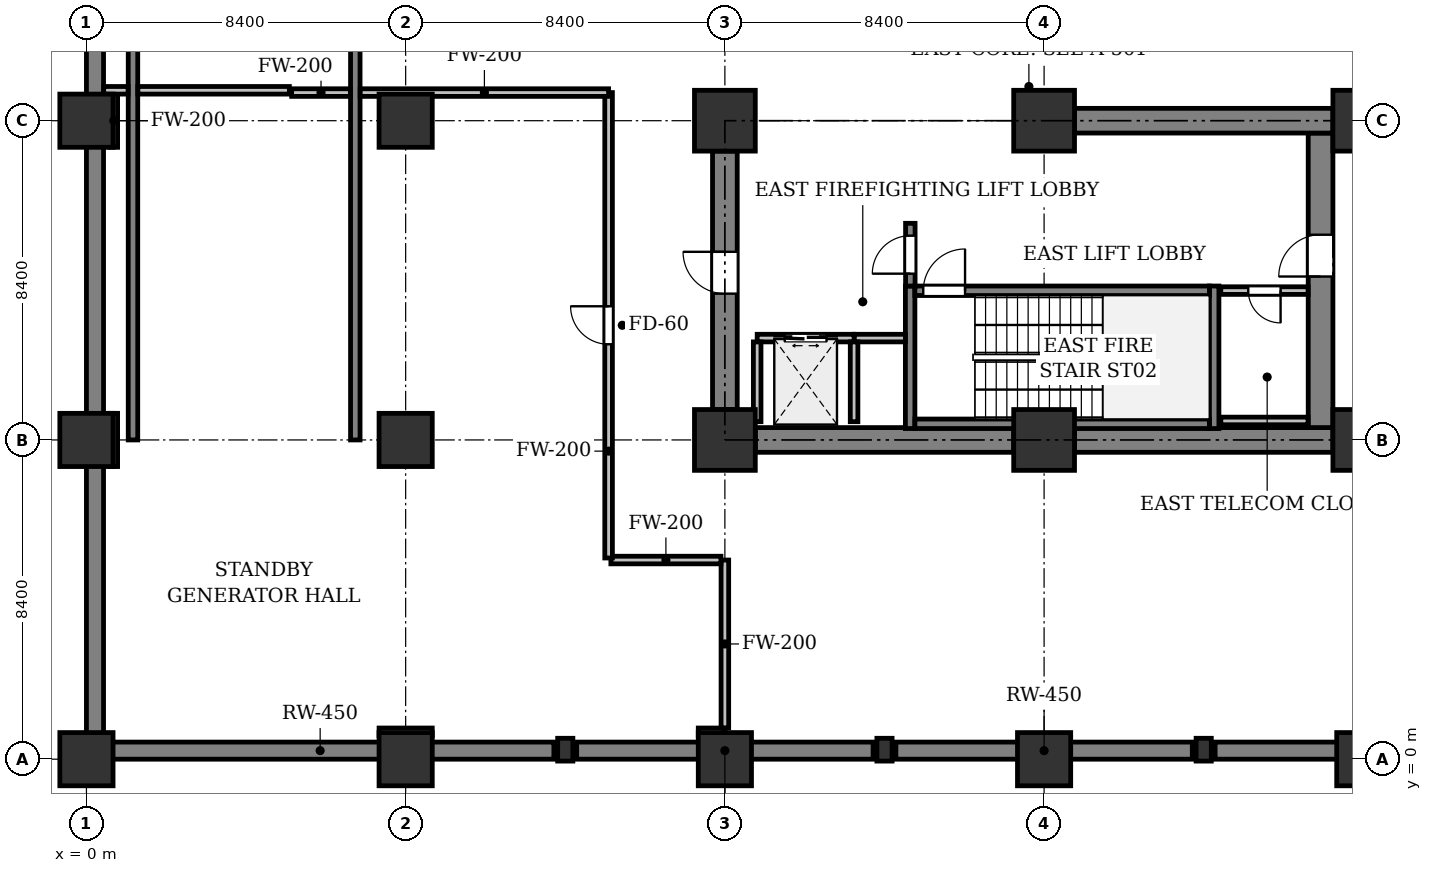
"""IFC4 building model, lengths in metres.
Left out: names, types, materials, properties, quantities, classifications, styles, units other than length and angle.
Written with IfcOpenShell. Run it as: python <this file> out.ifc"""

import sys

from ifc_helpers import new_model, si_unit, direction, frame, frame_2d, origin, origin_2d, place, context, subcontext, project, spatial, rectangle, extrude, element, fill, save


model = new_model("IFC4")
c1 = context("Model", 3, precision=1e-05, world=origin(), true_north=direction((0.0, 1.0)))
c2 = subcontext(c1, "Body", "Model", "MODEL_VIEW")
j1 = project(units=[si_unit("LENGTHUNIT", "METRE"), si_unit("PLANEANGLEUNIT", "RADIAN")], contexts=[c1])
p1 = place(None, origin())
s1 = spatial("IfcSite", under=j1, at=p1, CompositionType="ELEMENT")
p2 = place(p1, origin())
s2 = spatial("IfcBuilding", under=s1, at=p2, CompositionType="ELEMENT")
p3 = place(p2, frame((0.0, 0.0, -9.6)))
s3 = spatial("IfcBuildingStorey", under=s2, at=p3, CompositionType="ELEMENT", Elevation=-9.6)
p4 = place(p3, frame((0.0, 0.225, 0.0), z_axis=(0.0, 0.0, 1.0), x_axis=(1.0, 0.0, 0.0)))
e1 = element("IfcWall", 1, at=p4, inside=s3, PredefinedType="SOLIDWALL", context=c2, shape_type="SweptSolid", body=[
    extrude(rectangle(XDim=12.3, YDim=0.45, at=frame_2d((6.15, 0.0))), origin(), (0.0, 0.0, 1.0), 4.48),
])
for number, where, z_axis, x_axis in (
    (2, (12.9, 0.225, 0.0), (0.0, 0.0, 1.0), (1.0, 0.0, 0.0)),
    (3, (21.3, 0.225, 0.0), (0.0, 0.0, 1.0), (1.0, 0.0, 0.0)),
):
    element("IfcWall", number, at=place(p3, frame(where, z_axis=z_axis, x_axis=x_axis)), inside=s3, PredefinedType="SOLIDWALL", context=c2, shape_type="SweptSolid", body=[
        extrude(rectangle(XDim=7.8, YDim=0.45, at=frame_2d((3.9, 0.0))), origin(), (0.0, 0.0, 1.0), 4.48),
    ])
p5 = place(p3, frame((29.7, 0.225, 0.0), z_axis=(0.0, 0.0, 1.0), x_axis=(1.0, 0.0, 0.0)))
e4 = element("IfcWall", 4, at=p5, inside=s3, PredefinedType="SOLIDWALL", context=c2, shape_type="SweptSolid", body=[
    extrude(rectangle(XDim=29.1, YDim=0.45, at=frame_2d((14.55, 0.0))), origin(), (0.0, 0.0, 1.0), 4.48),
])
p6 = place(p3, frame((0.225, 0.45, 0.0), z_axis=(0.0, 0.0, 1.0), x_axis=(0.0, 1.0, 0.0)))
e5 = element("IfcWall", 5, at=p6, inside=s3, PredefinedType="SOLIDWALL", context=c2, shape_type="SweptSolid", body=[
    extrude(rectangle(XDim=49.5, YDim=0.45, at=frame_2d((24.75, 0.0))), origin(), (0.0, 0.0, 1.0), 4.48),
])
for number, where, z_axis, x_axis in (
    (6, (1.225, 8.4, 0.0), (0.0, 0.0, 1.0), (0.0, 1.0, 0.0)),
    (7, (7.075, 8.4, 0.0), (0.0, 0.0, 1.0), (0.0, 1.0, 0.0)),
):
    element("IfcWall", number, at=place(p3, frame(where, z_axis=z_axis, x_axis=x_axis)), inside=s3, PredefinedType="SHEAR", context=c2, shape_type="SweptSolid", body=[
        extrude(rectangle(XDim=38.4, YDim=0.25, at=frame_2d((19.2, 0.0))), origin(), (0.0, 0.0, 1.0), 4.48),
    ])
for number, where, z_axis, x_axis in (
    (8, (0.0, 0.0, 0.0), (0.0, 0.0, 1.0), (1.0, 0.0, 0.0)),
    (9, (0.0, 8.4, 0.0), (0.0, 0.0, 1.0), (1.0, 0.0, 0.0)),
    (10, (0.0, 16.8, 0.0), (0.0, 0.0, 1.0), (1.0, 0.0, 0.0)),
    (11, (8.4, 0.0, 0.0), (0.0, 0.0, 1.0), (1.0, 0.0, 0.0)),
    (12, (8.4, 8.4, 0.0), (0.0, 0.0, 1.0), (1.0, 0.0, 0.0)),
    (13, (8.4, 16.8, 0.0), (0.0, 0.0, 1.0), (1.0, 0.0, 0.0)),
    (14, (16.8, 0.0, 0.0), (0.0, 0.0, 1.0), (1.0, 0.0, 0.0)),
):
    element("IfcColumn", number, at=place(p3, frame(where, z_axis=z_axis, x_axis=x_axis)), inside=s3, PredefinedType="COLUMN", context=c2, shape_type="SweptSolid", body=[
        extrude(rectangle(XDim=1.4, YDim=1.4, at=origin_2d()), origin(), (0.0, 0.0, 1.0), 4.8),
    ])
for number, where, z_axis, x_axis in (
    (15, (16.8, 8.4, 0.0), (0.0, 0.0, 1.0), (1.0, 0.0, 0.0)),
    (16, (16.8, 16.8, 0.0), (0.0, 0.0, 1.0), (1.0, 0.0, 0.0)),
):
    element("IfcColumn", number, at=place(p3, frame(where, z_axis=z_axis, x_axis=x_axis)), inside=s3, PredefinedType="COLUMN", context=c2, shape_type="SweptSolid", body=[
        extrude(rectangle(XDim=1.6, YDim=1.6, at=origin_2d()), origin(), (0.0, 0.0, 1.0), 4.8),
    ])
p7 = place(p3, frame((25.2, 0.0, 0.0), z_axis=(0.0, 0.0, 1.0), x_axis=(1.0, 0.0, 0.0)))
e17 = element("IfcColumn", 17, at=p7, inside=s3, PredefinedType="COLUMN", context=c2, shape_type="SweptSolid", body=[
    extrude(rectangle(XDim=1.4, YDim=1.4, at=origin_2d()), origin(), (0.0, 0.0, 1.0), 4.8),
])
for number, where, z_axis, x_axis in (
    (18, (25.2, 8.4, 0.0), (0.0, 0.0, 1.0), (1.0, 0.0, 0.0)),
    (19, (25.2, 16.8, 0.0), (0.0, 0.0, 1.0), (1.0, 0.0, 0.0)),
):
    element("IfcColumn", number, at=place(p3, frame(where, z_axis=z_axis, x_axis=x_axis)), inside=s3, PredefinedType="COLUMN", context=c2, shape_type="SweptSolid", body=[
        extrude(rectangle(XDim=1.6, YDim=1.6, at=origin_2d()), origin(), (0.0, 0.0, 1.0), 4.8),
    ])
p8 = place(p3, frame((33.6, 0.0, 0.0), z_axis=(0.0, 0.0, 1.0), x_axis=(1.0, 0.0, 0.0)))
e20 = element("IfcColumn", 20, at=p8, inside=s3, PredefinedType="COLUMN", context=c2, shape_type="SweptSolid", body=[
    extrude(rectangle(XDim=1.4, YDim=1.4, at=origin_2d()), origin(), (0.0, 0.0, 1.0), 4.8),
])
for number, where, z_axis, x_axis in (
    (21, (33.6, 8.4, 0.0), (0.0, 0.0, 1.0), (1.0, 0.0, 0.0)),
    (22, (33.6, 16.8, 0.0), (0.0, 0.0, 1.0), (1.0, 0.0, 0.0)),
):
    element("IfcColumn", number, at=place(p3, frame(where, z_axis=z_axis, x_axis=x_axis)), inside=s3, PredefinedType="COLUMN", context=c2, shape_type="SweptSolid", body=[
        extrude(rectangle(XDim=1.6, YDim=1.6, at=origin_2d()), origin(), (0.0, 0.0, 1.0), 4.8),
    ])
for number, where, z_axis, x_axis in (
    (23, (12.6, 0.25, 0.0), (0.0, 0.0, 1.0), (1.0, 0.0, 0.0)),
    (24, (21.0, 0.25, 0.0), (0.0, 0.0, 1.0), (1.0, 0.0, 0.0)),
    (25, (29.4, 0.25, 0.0), (0.0, 0.0, 1.0), (1.0, 0.0, 0.0)),
):
    element("IfcColumn", number, at=place(p3, frame(where, z_axis=z_axis, x_axis=x_axis)), inside=s3, PredefinedType="PILASTER", context=c2, shape_type="SweptSolid", body=[
        extrude(rectangle(XDim=0.4, YDim=0.6, at=origin_2d()), origin(), (0.0, 0.0, 1.0), 4.8),
    ])
p9 = place(p3, frame((17.6, 8.4, 0.0), z_axis=(0.0, 0.0, 1.0), x_axis=(1.0, 0.0, 0.0)))
e26 = element("IfcWall", 26, at=p9, inside=s3, PredefinedType="SHEAR", context=c2, shape_type="SweptSolid", body=[
    extrude(rectangle(XDim=6.8, YDim=0.65, at=frame_2d((3.4, 0.0))), origin(), (0.0, 0.0, 1.0), 4.48),
])
p10 = place(p3, frame((26.0, 8.4, 0.0), z_axis=(0.0, 0.0, 1.0), x_axis=(1.0, 0.0, 0.0)))
e27 = element("IfcWall", 27, at=p10, inside=s3, PredefinedType="SHEAR", context=c2, shape_type="SweptSolid", body=[
    extrude(rectangle(XDim=6.8, YDim=0.65, at=frame_2d((3.4, 0.0))), origin(), (0.0, 0.0, 1.0), 4.48),
])
p11 = place(p3, frame((32.475, 8.725, 0.0), z_axis=(0.0, 0.0, 1.0), x_axis=(0.0, 1.0, 0.0)))
e28 = element("IfcWall", 28, at=p11, inside=s3, PredefinedType="SHEAR", context=c2, shape_type="SweptSolid", body=[
    extrude(rectangle(XDim=7.75, YDim=0.65, at=frame_2d((3.875, 0.0))), origin(), (0.0, 0.0, 1.0), 4.48),
])
p12 = place(p11, frame((3.975, 0.0, 0.0)))
e29 = element("IfcOpeningElement", 29, at=p12, cuts=e28, PredefinedType="OPENING", context=c2, shape_type="SweptSolid", body=[
    extrude(rectangle(XDim=1.1, YDim=2.15, at=frame_2d((0.55, 1.075))), frame((0.0, 0.335, 0.0), z_axis=(0.0, -1.0, 0.0), x_axis=(1.0, 0.0, 0.0)), (0.0, 0.0, 1.0), 0.67),
])
p13 = place(p3, frame((16.8, 9.2, 0.0), z_axis=(0.0, 0.0, 1.0), x_axis=(0.0, 1.0, 0.0)))
e30 = element("IfcWall", 30, at=p13, inside=s3, PredefinedType="SHEAR", context=c2, shape_type="SweptSolid", body=[
    extrude(rectangle(XDim=6.8, YDim=0.65, at=frame_2d((3.4, 0.0))), origin(), (0.0, 0.0, 1.0), 4.48),
])
p14 = place(p13, frame((3.05, 0.0, 0.0)))
e31 = element("IfcOpeningElement", 31, at=p14, cuts=e30, PredefinedType="OPENING", context=c2, shape_type="SweptSolid", body=[
    extrude(rectangle(XDim=1.1, YDim=2.15, at=frame_2d((0.55, 1.075))), frame((0.0, 0.335, 0.0), z_axis=(0.0, -1.0, 0.0), x_axis=(1.0, 0.0, 0.0)), (0.0, 0.0, 1.0), 0.67),
])
p15 = place(p3, frame((26.0, 16.8, 0.0), z_axis=(0.0, 0.0, 1.0), x_axis=(1.0, 0.0, 0.0)))
e32 = element("IfcWall", 32, at=p15, inside=s3, PredefinedType="SHEAR", context=c2, shape_type="SweptSolid", body=[
    extrude(rectangle(XDim=6.8, YDim=0.65, at=frame_2d((3.4, 0.0))), origin(), (0.0, 0.0, 1.0), 4.48),
])
for number, where, z_axis, x_axis in (
    (33, (21.675, 8.7, 0.0), (0.0, 0.0, 1.0), (0.0, 1.0, 0.0)),
    (34, (29.675, 8.7, 0.0), (0.0, 0.0, 1.0), (0.0, 1.0, 0.0)),
):
    element("IfcWall", number, at=place(p3, frame(where, z_axis=z_axis, x_axis=x_axis)), inside=s3, PredefinedType="SHEAR", context=c2, shape_type="SweptSolid", body=[
        extrude(rectangle(XDim=3.75, YDim=0.25, at=frame_2d((1.875, 0.0))), origin(), (0.0, 0.0, 1.0), 4.48),
    ])
p16 = place(p3, frame((21.8, 8.825, 0.0), z_axis=(0.0, 0.0, 1.0), x_axis=(1.0, 0.0, 0.0)))
e35 = element("IfcWall", 35, at=p16, inside=s3, PredefinedType="SHEAR", context=c2, shape_type="SweptSolid", body=[
    extrude(rectangle(XDim=7.75, YDim=0.25, at=frame_2d((3.875, 0.0))), origin(), (0.0, 0.0, 1.0), 4.48),
])
p17 = place(p3, frame((21.8, 12.325, 0.0), z_axis=(0.0, 0.0, 1.0), x_axis=(1.0, 0.0, 0.0)))
e36 = element("IfcWall", 36, at=p17, inside=s3, PredefinedType="SHEAR", context=c2, shape_type="SweptSolid", body=[
    extrude(rectangle(XDim=7.75, YDim=0.25, at=frame_2d((3.875, 0.0))), origin(), (0.0, 0.0, 1.0), 4.48),
])
p18 = place(p17, frame((0.22, 0.0, 0.0)))
e37 = element("IfcOpeningElement", 37, at=p18, cuts=e36, PredefinedType="OPENING", context=c2, shape_type="SweptSolid", body=[
    extrude(rectangle(XDim=1.1, YDim=2.15, at=frame_2d((0.55, 1.075))), frame((0.0, 0.135, 0.0), z_axis=(0.0, -1.0, 0.0), x_axis=(1.0, 0.0, 0.0)), (0.0, 0.0, 1.0), 0.27),
])
p19 = place(p3, frame((20.2, 11.08, 0.0), z_axis=(0.0, 0.0, 1.0), x_axis=(1.0, 0.0, 0.0)))
e38 = element("IfcWall", 38, at=p19, inside=s3, PredefinedType="PARTITIONING", context=c2, shape_type="SweptSolid", body=[
    extrude(rectangle(XDim=1.35, YDim=0.2, at=frame_2d((0.675, 0.0))), origin(), (0.0, 0.0, 1.0), 4.48),
])
p20 = place(p3, frame((21.68, 12.45, 0.0), z_axis=(0.0, 0.0, 1.0), x_axis=(0.0, 1.0, 0.0)))
e39 = element("IfcWall", 39, at=p20, inside=s3, PredefinedType="SHEAR", context=c2, shape_type="SweptSolid", body=[
    extrude(rectangle(XDim=1.65, YDim=0.25, at=frame_2d((0.825, 0.0))), origin(), (0.0, 0.0, 1.0), 4.48),
])
p21 = place(p20, frame((0.325, 0.0, 0.0)))
e40 = element("IfcOpeningElement", 40, at=p21, cuts=e39, PredefinedType="OPENING", context=c2, shape_type="SweptSolid", body=[
    extrude(rectangle(XDim=1.0, YDim=2.15, at=frame_2d((0.5, 1.075))), frame((0.0, 0.135, 0.0), z_axis=(0.0, -1.0, 0.0), x_axis=(1.0, 0.0, 0.0)), (0.0, 0.0, 1.0), 0.27),
])
p22 = place(p3, frame((17.65, 11.08, 0.0), z_axis=(0.0, 0.0, 1.0), x_axis=(1.0, 0.0, 0.0)))
e41 = element("IfcWall", 41, at=p22, inside=s3, PredefinedType="PARTITIONING", context=c2, shape_type="SweptSolid", body=[
    extrude(rectangle(XDim=2.55, YDim=0.2, at=frame_2d((1.275, 0.0))), origin(), (0.0, 0.0, 1.0), 4.48),
])
p23 = place(p22, frame((0.725, 0.0, 0.0)))
e42 = element("IfcOpeningElement", 42, at=p23, cuts=e41, PredefinedType="OPENING", context=c2, shape_type="SweptSolid", body=[
    extrude(rectangle(XDim=1.1, YDim=2.2, at=frame_2d((0.55, 1.1))), frame((0.0, 0.11, 0.0), z_axis=(0.0, -1.0, 0.0), x_axis=(1.0, 0.0, 0.0)), (0.0, 0.0, 1.0), 0.22),
])
for number, where, z_axis, x_axis in (
    (43, (20.2, 8.88, 0.0), (0.0, 0.0, 1.0), (0.0, 1.0, 0.0)),
    (44, (17.65, 8.88, 0.0), (0.0, 0.0, 1.0), (0.0, 1.0, 0.0)),
):
    element("IfcWall", number, at=place(p3, frame(where, z_axis=z_axis, x_axis=x_axis)), inside=s3, PredefinedType="PARTITIONING", context=c2, shape_type="SweptSolid", body=[
        extrude(rectangle(XDim=2.1, YDim=0.2, at=frame_2d((1.05, 0.0))), origin(), (0.0, 0.0, 1.0), 4.48),
    ])
p24 = place(p3, frame((32.146, 12.33, 0.0), z_axis=(0.0, 0.0, 1.0), x_axis=(-1.0, 0.0, 0.0)))
e45 = element("IfcWall", 45, at=p24, inside=s3, PredefinedType="PARTITIONING", context=c2, shape_type="SweptSolid", body=[
    extrude(rectangle(XDim=2.296, YDim=0.2, at=frame_2d((1.148, 0.0))), origin(), (0.0, 0.0, 1.0), 4.48),
])
p25 = place(p24, frame((0.723, 0.0, 0.0)))
e46 = element("IfcOpeningElement", 46, at=p25, cuts=e45, PredefinedType="OPENING", context=c2, shape_type="SweptSolid", body=[
    extrude(rectangle(XDim=0.85, YDim=2.15, at=frame_2d((0.425, 1.075))), frame((0.0, 0.11, 0.0), z_axis=(0.0, -1.0, 0.0), x_axis=(1.0, 0.0, 0.0)), (0.0, 0.0, 1.0), 0.22),
])
p26 = place(p3, frame((29.85, 8.9, 0.0), z_axis=(0.0, 0.0, 1.0), x_axis=(1.0, 0.0, 0.0)))
e47 = element("IfcWall", 47, at=p26, inside=s3, PredefinedType="PARTITIONING", context=c2, shape_type="SweptSolid", body=[
    extrude(rectangle(XDim=2.296, YDim=0.2, at=frame_2d((1.148, 0.0))), origin(), (0.0, 0.0, 1.0), 4.48),
])
p27 = place(p3, frame((0.72, 17.502, 0.0), z_axis=(0.0, 0.0, 1.0), x_axis=(0.0, -1.0, 0.0)))
e48 = element("IfcWall", 48, at=p27, inside=s3, PredefinedType="PARTITIONING", context=c2, shape_type="SweptSolid", body=[
    extrude(rectangle(XDim=1.402, YDim=0.2, at=frame_2d((0.701, 0.0))), origin(), (0.0, 0.0, 1.0), 4.48),
])
p28 = place(p3, frame((0.72, 9.1, 0.0), z_axis=(0.0, 0.0, 1.0), x_axis=(0.0, -1.0, 0.0)))
e49 = element("IfcWall", 49, at=p28, inside=s3, PredefinedType="PARTITIONING", context=c2, shape_type="SweptSolid", body=[
    extrude(rectangle(XDim=1.4, YDim=0.2, at=frame_2d((0.7, 0.0))), origin(), (0.0, 0.0, 1.0), 4.48),
])
p29 = place(p3, frame((7.7, 0.72, 0.0), z_axis=(0.0, 0.0, 1.0), x_axis=(1.0, 0.0, 0.0)))
e50 = element("IfcWall", 50, at=p29, inside=s3, PredefinedType="PARTITIONING", context=c2, shape_type="SweptSolid", body=[
    extrude(rectangle(XDim=1.4, YDim=0.2, at=frame_2d((0.7, 0.0))), origin(), (0.0, 0.0, 1.0), 3.868),
])
p30 = place(p3, frame((16.1, 0.72, 0.0), z_axis=(0.0, 0.0, 1.0), x_axis=(1.0, 0.0, 0.0)))
e51 = element("IfcWall", 51, at=p30, inside=s3, PredefinedType="PARTITIONING", context=c2, shape_type="SweptSolid", body=[
    extrude(rectangle(XDim=0.7, YDim=0.2, at=frame_2d((0.35, 0.0))), origin(), (0.0, 0.0, 1.0), 3.868),
])
p31 = place(p3, frame((16.8, 0.824, 0.0), z_axis=(0.0, 0.0, 1.0), x_axis=(0.0, 1.0, 0.0)))
e52 = element("IfcWall", 52, at=p31, inside=s3, PredefinedType="PARTITIONING", context=c2, shape_type="SweptSolid", body=[
    extrude(rectangle(XDim=4.416, YDim=0.2, at=frame_2d((2.208, 0.0))), origin(), (0.0, 0.0, 1.0), 3.868),
])
p32 = place(p3, frame((16.696, 5.24, 0.0), z_axis=(0.0, 0.0, 1.0), x_axis=(-1.0, 0.0, 0.0)))
e53 = element("IfcWall", 53, at=p32, inside=s3, PredefinedType="PARTITIONING", context=c2, shape_type="SweptSolid", body=[
    extrude(rectangle(XDim=2.896, YDim=0.2, at=frame_2d((1.448, 0.0))), origin(), (0.0, 0.0, 1.0), 3.868),
])
p33 = place(p3, frame((13.74, 5.294, 0.0), z_axis=(0.0, 0.0, 1.0), x_axis=(-1.9936602e-05, 0.999999999801, 0.0)))
e54 = element("IfcWall", 54, at=p33, inside=s3, PredefinedType="PARTITIONING", context=c2, shape_type="SweptSolid", body=[
    extrude(rectangle(XDim=12.246, YDim=0.2, at=frame_2d((6.123, 0.0))), origin(), (0.0, 0.0, 1.0), 3.78),
])
p34 = place(p33, frame((5.623, 0.0, 0.0)))
e55 = element("IfcOpeningElement", 55, at=p34, cuts=e54, PredefinedType="OPENING", context=c2, shape_type="SweptSolid", body=[
    extrude(rectangle(XDim=1.0, YDim=2.15, at=frame_2d((0.5, 1.075))), frame((0.0, 0.11, 0.0), z_axis=(0.0, -1.0, 0.0), x_axis=(1.0, 0.0, 0.0)), (0.0, 0.0, 1.0), 0.22),
])
p35 = place(p3, frame((13.74, 17.54, 0.0), z_axis=(0.0, 0.0, 1.0), x_axis=(-1.0, 0.0, 0.0)))
e56 = element("IfcWall", 56, at=p35, inside=s3, PredefinedType="PARTITIONING", context=c2, shape_type="SweptSolid", body=[
    extrude(rectangle(XDim=6.536, YDim=0.2, at=frame_2d((3.268, 0.0))), origin(), (0.0, 0.0, 1.0), 3.868),
])
p36 = place(p3, frame((6.946, 17.54, 0.0), z_axis=(0.0, 0.0, 1.0), x_axis=(-1.0, 0.0, 0.0)))
e57 = element("IfcWall", 57, at=p36, inside=s3, PredefinedType="PARTITIONING", context=c2, shape_type="SweptSolid", body=[
    extrude(rectangle(XDim=1.546, YDim=0.2, at=frame_2d((0.773, 0.0))), origin(), (0.0, 0.0, 1.0), 4.48),
])
p37 = place(p3, frame((5.34, 17.6, 0.0), z_axis=(0.0, 0.0, 1.0), x_axis=(-1.0, 0.0, 0.0)))
e58 = element("IfcWall", 58, at=p37, inside=s3, PredefinedType="PARTITIONING", context=c2, shape_type="SweptSolid", body=[
    extrude(rectangle(XDim=3.986, YDim=0.2, at=frame_2d((1.993, 0.0))), origin(), (0.0, 0.0, 1.0), 4.48),
])
p38 = place(p3, frame((1.096, 17.6, 0.0), z_axis=(0.0, 0.0, 1.0), x_axis=(-1.0, 0.0, 0.0)))
e59 = element("IfcWall", 59, at=p38, inside=s3, PredefinedType="PARTITIONING", context=c2, shape_type="SweptSolid", body=[
    extrude(rectangle(XDim=0.642, YDim=0.2, at=frame_2d((0.321, 0.0))), origin(), (0.0, 0.0, 1.0), 4.48),
])
p39 = place(p12, origin())
e60 = element("IfcDoor", 60, at=p39, inside=s3, OperationType="SINGLE_SWING_LEFT", PredefinedType="DOOR", context=c2, shape_type="SweptSolid", body=[
    extrude(rectangle(XDim=1.1, YDim=2.15, at=frame_2d((0.55, 1.075))), frame((0.0, 0.025, 0.0), z_axis=(0.0, -1.0, 0.0), x_axis=(1.0, 0.0, 0.0)), (0.0, 0.0, 1.0), 0.05),
])
fill(e29, e60)
p40 = place(p14, origin())
e61 = element("IfcDoor", 61, at=p40, inside=s3, OperationType="SINGLE_SWING_RIGHT", PredefinedType="DOOR", context=c2, shape_type="SweptSolid", body=[
    extrude(rectangle(XDim=1.1, YDim=2.15, at=frame_2d((0.55, 1.075))), frame((0.0, 0.025, 0.0), z_axis=(0.0, -1.0, 0.0), x_axis=(1.0, 0.0, 0.0)), (0.0, 0.0, 1.0), 0.05),
])
fill(e31, e61)
p41 = place(p18, origin())
e62 = element("IfcDoor", 62, at=p41, inside=s3, OperationType="SINGLE_SWING_RIGHT", PredefinedType="DOOR", context=c2, shape_type="SweptSolid", body=[
    extrude(rectangle(XDim=1.1, YDim=2.15, at=frame_2d((0.55, 1.075))), frame((0.0, 0.025, 0.0), z_axis=(0.0, -1.0, 0.0), x_axis=(1.0, 0.0, 0.0)), (0.0, 0.0, 1.0), 0.05),
])
fill(e37, e62)
p42 = place(p21, origin())
e63 = element("IfcDoor", 63, at=p42, inside=s3, OperationType="SINGLE_SWING_LEFT", PredefinedType="DOOR", context=c2, shape_type="SweptSolid", body=[
    extrude(rectangle(XDim=1.0, YDim=2.15, at=frame_2d((0.5, 1.075))), frame((0.0, 0.025, 0.0), z_axis=(0.0, -1.0, 0.0), x_axis=(1.0, 0.0, 0.0)), (0.0, 0.0, 1.0), 0.05),
])
fill(e40, e63)
p43 = place(p23, origin())
e64 = element("IfcDoor", 64, at=p43, inside=s3, OperationType="DOUBLE_DOOR_SLIDING", PredefinedType="DOOR", context=c2, shape_type="SweptSolid", body=[
    extrude(rectangle(XDim=1.1, YDim=2.2, at=frame_2d((0.55, 1.1))), frame((0.0, 0.025, 0.0), z_axis=(0.0, -1.0, 0.0), x_axis=(1.0, 0.0, 0.0)), (0.0, 0.0, 1.0), 0.05),
])
fill(e42, e64)
p44 = place(p25, origin())
e65 = element("IfcDoor", 65, at=p44, inside=s3, OperationType="SINGLE_SWING_LEFT", PredefinedType="DOOR", context=c2, shape_type="SweptSolid", body=[
    extrude(rectangle(XDim=0.85, YDim=2.15, at=frame_2d((0.425, 1.075))), frame((0.0, 0.025, 0.0), z_axis=(0.0, -1.0, 0.0), x_axis=(1.0, 0.0, 0.0)), (0.0, 0.0, 1.0), 0.05),
])
fill(e46, e65)
p45 = place(p34, origin())
e66 = element("IfcDoor", 66, at=p45, inside=s3, OperationType="SINGLE_SWING_RIGHT", PredefinedType="DOOR", context=c2, shape_type="SweptSolid", body=[
    extrude(rectangle(XDim=1.0, YDim=2.15, at=frame_2d((0.5, 1.075))), frame((0.0, 0.025, 0.0), z_axis=(0.0, -1.0, 0.0), x_axis=(1.0, 0.0, 0.0)), (0.0, 0.0, 1.0), 0.05),
])
fill(e55, e66)
save(model, sys.argv[1])
